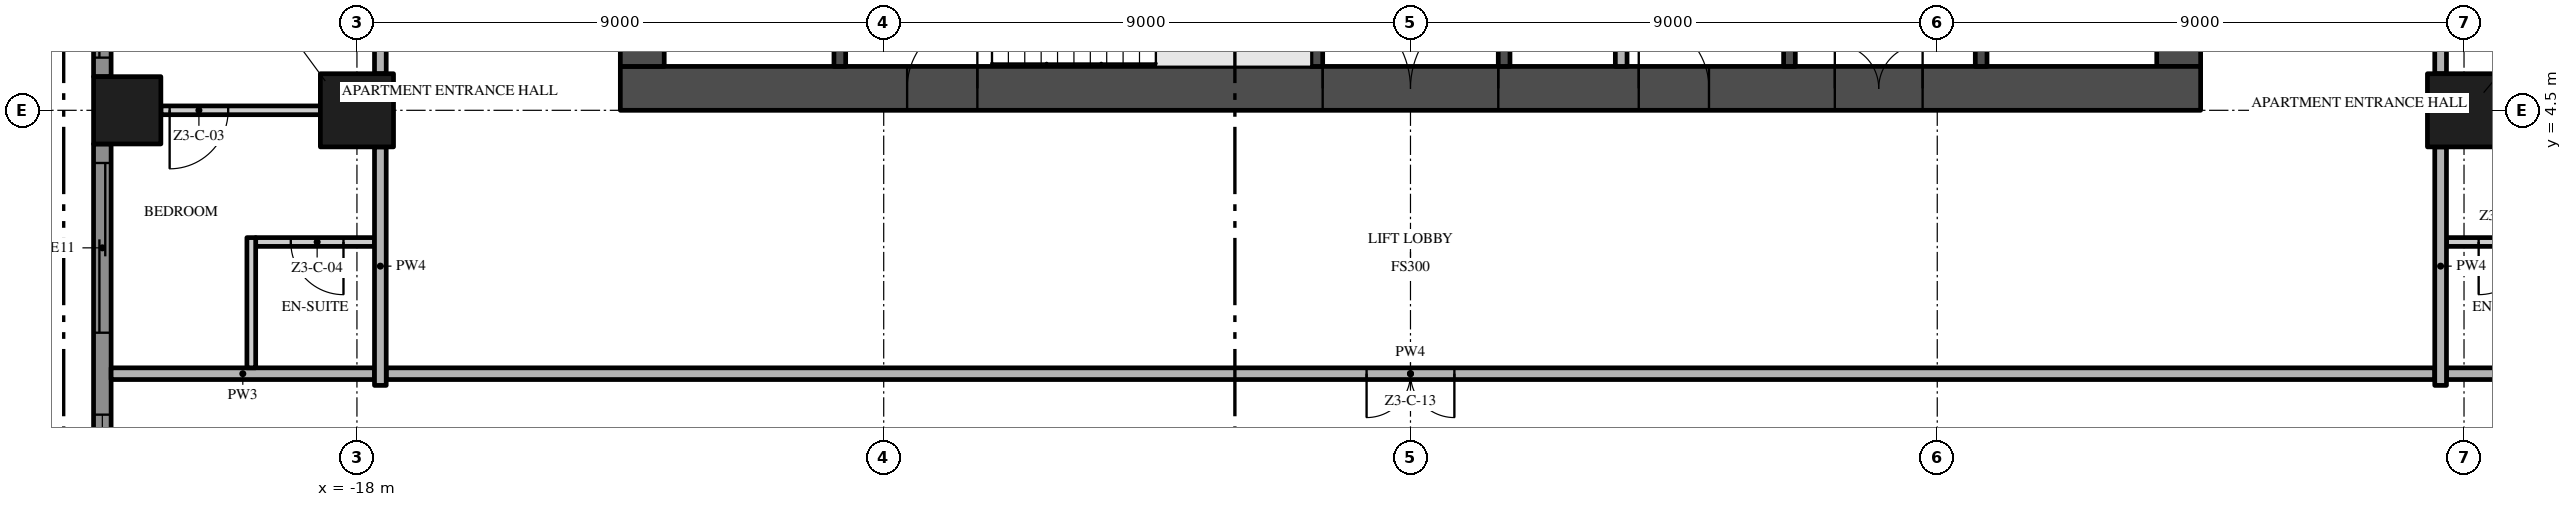
"""IFC4 building model, lengths in metres.
Left out: names, types, materials, properties, quantities, classifications, styles, units other than length and angle.
Written with IfcOpenShell. Run it as: python <this file> out.ifc"""

import sys

from ifc_helpers import new_model, si_unit, direction, frame, frame_2d, origin, origin_2d, place, context, subcontext, project, spatial, polyline, rectangle, outline, extrude, element, fill, save


model = new_model("IFC4")
c1 = context("Model", 3, precision=1e-05, world=origin(), true_north=direction((0.0, 1.0)))
c2 = subcontext(c1, "Body", "Model", "MODEL_VIEW")
j1 = project(units=[si_unit("LENGTHUNIT", "METRE"), si_unit("PLANEANGLEUNIT", "RADIAN")], contexts=[c1])
p1 = place(None, origin())
s1 = spatial("IfcSite", under=j1, at=p1, CompositionType="ELEMENT")
p2 = place(p1, origin())
s2 = spatial("IfcBuilding", under=s1, at=p2, CompositionType="ELEMENT")
p3 = place(p2, frame((0.0, 0.0, 155.4)))
s3 = spatial("IfcBuildingStorey", under=s2, at=p3, CompositionType="ELEMENT", Elevation=155.4)
p4 = place(p3, frame((-13.5, 4.875, -0.3), z_axis=(0.0, 0.0, 1.0), x_axis=(1.0, 0.0, 0.0)))
e1 = element("IfcWall", 1, at=p4, inside=s3, PredefinedType="SHEAR", context=c2, shape_type="SweptSolid", body=[
    extrude(rectangle(XDim=27.0, YDim=0.75, at=frame_2d((13.5, 0.0))), origin(), (0.0, 0.0, 1.0), 3.8),
])
p5 = place(p4, frame((12.0, 0.0, 0.3)))
e2 = element("IfcOpeningElement", 2, at=p5, cuts=e1, PredefinedType="OPENING", context=c2, shape_type="SweptSolid", body=[
    extrude(rectangle(XDim=3.0, YDim=2.4, at=frame_2d((1.5, 1.2))), frame((0.0, 0.385, 0.0), z_axis=(0.0, -1.0, 0.0), x_axis=(1.0, 0.0, 0.0)), (0.0, 0.0, 1.0), 0.77),
])
p6 = place(p4, frame((4.9, 0.0, 0.3)))
e3 = element("IfcOpeningElement", 3, at=p6, cuts=e1, PredefinedType="OPENING", context=c2, shape_type="SweptSolid", body=[
    extrude(rectangle(XDim=1.2, YDim=2.2, at=frame_2d((0.6, 1.1))), frame((0.0, 0.385, 0.0), z_axis=(0.0, -1.0, 0.0), x_axis=(1.0, 0.0, 0.0)), (0.0, 0.0, 1.0), 0.77),
])
p7 = place(p4, frame((20.75, 0.0, 0.3)))
e4 = element("IfcOpeningElement", 4, at=p7, cuts=e1, PredefinedType="OPENING", context=c2, shape_type="SweptSolid", body=[
    extrude(rectangle(XDim=1.5, YDim=2.2, at=frame_2d((0.75, 1.1))), frame((0.0, 0.385, 0.0), z_axis=(0.0, -1.0, 0.0), x_axis=(1.0, 0.0, 0.0)), (0.0, 0.0, 1.0), 0.77),
])
p8 = place(p4, frame((17.4, 0.0, 0.3)))
e5 = element("IfcOpeningElement", 5, at=p8, cuts=e1, PredefinedType="OPENING", context=c2, shape_type="SweptSolid", body=[
    extrude(rectangle(XDim=1.2, YDim=2.2, at=frame_2d((0.6, 1.1))), frame((0.0, 0.385, 0.0), z_axis=(0.0, -1.0, 0.0), x_axis=(1.0, 0.0, 0.0)), (0.0, 0.0, 1.0), 0.77),
])
p9 = place(p3, frame((13.125, 5.25, -0.3), z_axis=(0.0, 0.0, 1.0), x_axis=(0.0, 1.0, 0.0)))
e6 = element("IfcWall", 6, at=p9, inside=s3, PredefinedType="SHEAR", context=c2, shape_type="SweptSolid", body=[
    extrude(rectangle(XDim=16.5, YDim=0.75, at=frame_2d((8.25, 0.0))), origin(), (0.0, 0.0, 1.0), 3.8),
])
p10 = place(p9, frame((6.15, 0.0, 0.3)))
e7 = element("IfcOpeningElement", 7, at=p10, cuts=e6, PredefinedType="OPENING", context=c2, shape_type="SweptSolid", body=[
    extrude(rectangle(XDim=1.2, YDim=2.2, at=frame_2d((0.6, 1.1))), frame((0.0, 0.385, 0.0), z_axis=(0.0, -1.0, 0.0), x_axis=(1.0, 0.0, 0.0)), (0.0, 0.0, 1.0), 0.77),
])
p11 = place(p3, frame((-13.125, 21.75, -0.3), z_axis=(0.0, 0.0, 1.0), x_axis=(0.0, -1.0, 0.0)))
e8 = element("IfcWall", 8, at=p11, inside=s3, PredefinedType="SHEAR", context=c2, shape_type="SweptSolid", body=[
    extrude(rectangle(XDim=16.5, YDim=0.75, at=frame_2d((8.25, 0.0))), origin(), (0.0, 0.0, 1.0), 3.8),
])
p12 = place(p11, frame((9.15, 0.0, 0.3)))
e9 = element("IfcOpeningElement", 9, at=p12, cuts=e8, PredefinedType="OPENING", context=c2, shape_type="SweptSolid", body=[
    extrude(rectangle(XDim=1.2, YDim=2.2, at=frame_2d((0.6, 1.1))), frame((0.0, 0.385, 0.0), z_axis=(0.0, -1.0, 0.0), x_axis=(1.0, 0.0, 0.0)), (0.0, 0.0, 1.0), 0.77),
])
p13 = place(p3, frame((-18.0, 4.5, 0.0), z_axis=(0.0, 0.0, 1.0), x_axis=(1.0, 0.0, 0.0)))
e10 = element("IfcColumn", 10, at=p13, inside=s3, PredefinedType="COLUMN", context=c2, shape_type="SweptSolid", body=[
    extrude(rectangle(XDim=1.25, YDim=1.25, at=origin_2d()), origin(), (0.0, 0.0, 1.0), 3.5),
])
p14 = place(p3, frame((-21.925, 4.5, 0.0), z_axis=(0.0, 0.0, 1.0), x_axis=(1.0, 0.0, 0.0)))
e11 = element("IfcColumn", 11, at=p14, inside=s3, PredefinedType="COLUMN", context=c2, shape_type="SweptSolid", body=[
    extrude(rectangle(XDim=1.15, YDim=1.15, at=origin_2d()), origin(), (0.0, 0.0, 1.0), 3.5),
])
p15 = place(p3, frame((18.0, 4.5, 0.0), z_axis=(0.0, 0.0, 1.0), x_axis=(1.0, 0.0, 0.0)))
e12 = element("IfcColumn", 12, at=p15, inside=s3, PredefinedType="COLUMN", context=c2, shape_type="SweptSolid", body=[
    extrude(rectangle(XDim=1.25, YDim=1.25, at=origin_2d()), origin(), (0.0, 0.0, 1.0), 3.5),
])
p16 = place(p3, frame((-22.35, 5.075, 0.0), z_axis=(0.0, 0.0, 1.0), x_axis=(0.0, 1.0, 0.0)))
e13 = element("IfcWall", 13, at=p16, inside=s3, PredefinedType="SOLIDWALL", context=c2, shape_type="SweptSolid", body=[
    extrude(rectangle(XDim=7.85, YDim=0.3, at=frame_2d((3.925, 0.0))), origin(), (0.0, 0.0, 1.0), 3.5),
])
p17 = place(p16, frame((4.625, 0.0, 0.45)))
e14 = element("IfcOpeningElement", 14, at=p17, cuts=e13, PredefinedType="OPENING", context=c2, shape_type="SweptSolid", body=[
    extrude(rectangle(XDim=2.9, YDim=2.65, at=frame_2d((1.45, 1.325))), frame((0.0, 0.16, 0.0), z_axis=(0.0, -1.0, 0.0), x_axis=(1.0, 0.0, 0.0)), (0.0, 0.0, 1.0), 0.32),
])
p18 = place(p16, frame((0.325, 0.0, 0.0)))
e15 = element("IfcOpeningElement", 15, at=p18, cuts=e13, PredefinedType="OPENING", context=c2, shape_type="SweptSolid", body=[
    extrude(rectangle(XDim=2.9, YDim=2.4, at=frame_2d((1.45, 1.2))), frame((0.0, 0.16, 0.0), z_axis=(0.0, -1.0, 0.0), x_axis=(1.0, 0.0, 0.0)), (0.0, 0.0, 1.0), 0.32),
])
p19 = place(p3, frame((-22.35, -3.925, 0.0), z_axis=(0.0, 0.0, 1.0), x_axis=(0.0, 1.0, 0.0)))
e16 = element("IfcWall", 16, at=p19, inside=s3, PredefinedType="SOLIDWALL", context=c2, shape_type="SweptSolid", body=[
    extrude(rectangle(XDim=7.85, YDim=0.3, at=frame_2d((3.925, 0.0))), origin(), (0.0, 0.0, 1.0), 3.5),
])
p20 = place(p19, frame((4.625, 0.0, 0.0)))
e17 = element("IfcOpeningElement", 17, at=p20, cuts=e16, PredefinedType="OPENING", context=c2, shape_type="SweptSolid", body=[
    extrude(rectangle(XDim=2.9, YDim=2.4, at=frame_2d((1.45, 1.2))), frame((0.0, 0.16, 0.0), z_axis=(0.0, -1.0, 0.0), x_axis=(1.0, 0.0, 0.0)), (0.0, 0.0, 1.0), 0.32),
])
p21 = place(p19, frame((0.325, 0.0, 0.45)))
e18 = element("IfcOpeningElement", 18, at=p21, cuts=e16, PredefinedType="OPENING", context=c2, shape_type="SweptSolid", body=[
    extrude(rectangle(XDim=2.9, YDim=2.65, at=frame_2d((1.45, 1.325))), frame((0.0, 0.16, 0.0), z_axis=(0.0, -1.0, 0.0), x_axis=(1.0, 0.0, 0.0)), (0.0, 0.0, 1.0), 0.32),
])
p22 = place(p3, origin())
e19 = element("IfcWall", 19, at=p22, inside=s3, PredefinedType="USERDEFINED", context=c2, shape_type="SweptSolid", body=[
    extrude(outline(polyline([(-25.149, 18.0), (-24.488, 16.5), (-23.755, 15.0), (-23.231, 13.5), (-23.1, 12.375), (-23.115, 12.0), (-23.451, 10.5), (-24.112, 9.0), (-24.845, 7.5), (-25.369, 6.0), (-25.5, 4.875), (-25.485, 4.5), (-25.149, 3.0), (-24.488, 1.5), (-23.755, 0.0), (-23.231, -1.5), (-23.1, -2.625), (-23.115, -3.0), (-23.451, -4.5), (-24.112, -6.0), (-24.845, -7.5), (-25.369, -9.0), (-25.5, -10.125), (-25.485, -10.5), (-25.149, -12.0), (-24.488, -13.5), (-24.259, -13.399), (-24.91, -11.921), (-25.236, -10.467), (-25.249, -10.135), (-25.124, -9.056), (-24.614, -7.596), (-23.885, -6.105), (-23.213, -4.579), (-22.866, -3.033), (-22.849, -2.615), (-22.986, -1.444), (-23.524, 0.096), (-24.261, 1.605), (-24.91, 3.079), (-25.236, 4.533), (-25.249, 4.865), (-25.124, 5.944), (-24.614, 7.404), (-23.885, 8.895), (-23.213, 10.421), (-22.866, 11.967), (-22.849, 12.385), (-22.986, 13.556), (-23.524, 15.096), (-24.261, 16.605), (-24.92, 18.101), (-25.149, 18.0)])), origin(), (0.0, 0.0, 1.0), 0.9),
])
for number, where, z_axis, x_axis in (
    (20, (-9.75, 5.25, 0.0), (0.0, 0.0, 1.0), (0.0, 1.0, 0.0)),
    (21, (-1.6, 5.25, 0.0), (0.0, 0.0, 1.0), (0.0, 1.0, 0.0)),
):
    element("IfcWall", number, at=place(p3, frame(where, z_axis=z_axis, x_axis=x_axis)), inside=s3, PredefinedType="SHEAR", context=c2, shape_type="SweptSolid", body=[
        extrude(rectangle(XDim=2.7, YDim=0.2, at=frame_2d((1.35, 0.0))), origin(), (0.0, 0.0, 1.0), 3.5),
    ])
p23 = place(p3, frame((1.6, 13.5, 0.0), z_axis=(0.0, 0.0, 1.0), x_axis=(0.0, -1.0, 0.0)))
e22 = element("IfcWall", 22, at=p23, inside=s3, PredefinedType="SHEAR", context=c2, shape_type="SweptSolid", body=[
    extrude(rectangle(XDim=8.25, YDim=0.2, at=frame_2d((4.125, 0.0))), origin(), (0.0, 0.0, 1.0), 3.5),
])
p24 = place(p23, frame((3.275, 0.0, 0.0)))
e23 = element("IfcOpeningElement", 23, at=p24, cuts=e22, PredefinedType="OPENING", context=c2, shape_type="SweptSolid", body=[
    extrude(rectangle(XDim=0.9, YDim=2.1, at=frame_2d((0.45, 1.05))), frame((0.0, 0.11, 0.0), z_axis=(0.0, -1.0, 0.0), x_axis=(1.0, 0.0, 0.0)), (0.0, 0.0, 1.0), 0.22),
])
p25 = place(p3, frame((3.6, 13.5, 0.0), z_axis=(0.0, 0.0, 1.0), x_axis=(0.0, -1.0, 0.0)))
e24 = element("IfcWall", 24, at=p25, inside=s3, PredefinedType="PARTITIONING", context=c2, shape_type="SweptSolid", body=[
    extrude(rectangle(XDim=8.25, YDim=0.2, at=frame_2d((4.125, 0.0))), origin(), (0.0, 0.0, 1.0), 3.5),
])
p26 = place(p25, frame((3.675, 0.0, 0.0)))
e25 = element("IfcOpeningElement", 25, at=p26, cuts=e24, PredefinedType="OPENING", context=c2, shape_type="SweptSolid", body=[
    extrude(rectangle(XDim=0.9, YDim=2.1, at=frame_2d((0.45, 1.05))), frame((0.0, 0.11, 0.0), z_axis=(0.0, -1.0, 0.0), x_axis=(1.0, 0.0, 0.0)), (0.0, 0.0, 1.0), 0.22),
])
p27 = place(p3, frame((6.475, 5.25, 0.0), z_axis=(0.0, 0.0, 1.0), x_axis=(0.0, 1.0, 0.0)))
e26 = element("IfcWall", 26, at=p27, inside=s3, PredefinedType="SHEAR", context=c2, shape_type="SweptSolid", body=[
    extrude(rectangle(XDim=6.85, YDim=0.2, at=frame_2d((3.425, 0.0))), origin(), (0.0, 0.0, 1.0), 3.5),
])
p28 = place(p3, frame((9.75, 5.25, 0.0), z_axis=(0.0, 0.0, 1.0), x_axis=(0.0, 1.0, 0.0)))
e27 = element("IfcWall", 27, at=p28, inside=s3, PredefinedType="SHEAR", context=c2, shape_type="SweptSolid", body=[
    extrude(rectangle(XDim=2.35, YDim=0.2, at=frame_2d((1.175, 0.0))), origin(), (0.0, 0.0, 1.0), 3.5),
])
p29 = place(p28, frame((0.7, 0.0, 0.0)))
e28 = element("IfcOpeningElement", 28, at=p29, cuts=e27, PredefinedType="OPENING", context=c2, shape_type="SweptSolid", body=[
    extrude(rectangle(XDim=1.1, YDim=2.1, at=frame_2d((0.55, 1.05))), frame((0.0, 0.11, 0.0), z_axis=(0.0, -1.0, 0.0), x_axis=(1.0, 0.0, 0.0)), (0.0, 0.0, 1.0), 0.22),
])
p30 = place(p3, frame((17.5, 0.0, 0.0), z_axis=(0.0, 0.0, 1.0), x_axis=(-1.0, 0.0, 0.0)))
e29 = element("IfcWall", 29, at=p30, inside=s3, PredefinedType="PARTITIONING", context=c2, shape_type="SweptSolid", body=[
    extrude(rectangle(XDim=35.0, YDim=0.2, at=frame_2d((17.5, 0.0))), origin(), (0.0, 0.0, 1.0), 3.5),
])
p31 = place(p30, frame((16.75, 0.0, 0.0)))
e30 = element("IfcOpeningElement", 30, at=p31, cuts=e29, PredefinedType="OPENING", context=c2, shape_type="SweptSolid", body=[
    extrude(rectangle(XDim=1.5, YDim=2.4, at=frame_2d((0.75, 1.2))), frame((0.0, 0.11, 0.0), z_axis=(0.0, -1.0, 0.0), x_axis=(1.0, 0.0, 0.0)), (0.0, 0.0, 1.0), 0.22),
])
for number, where, z_axis, x_axis in (
    (31, (-22.2, 0.0, 0.0), (0.0, 0.0, 1.0), (1.0, 0.0, 0.0)),
    (32, (17.7, 0.0, 0.0), (0.0, 0.0, 1.0), (1.0, 0.0, 0.0)),
):
    element("IfcWall", number, at=place(p3, frame(where, z_axis=z_axis, x_axis=x_axis)), inside=s3, PredefinedType="PARTITIONING", context=c2, shape_type="SweptSolid", body=[
        extrude(rectangle(XDim=4.5, YDim=0.2, at=frame_2d((2.25, 0.0))), origin(), (0.0, 0.0, 1.0), 3.5),
    ])
p32 = place(p3, frame((-17.7, 2.25, 0.0), z_axis=(0.0, 0.0, 1.0), x_axis=(-1.0, 0.0, 0.0)))
e33 = element("IfcWall", 33, at=p32, inside=s3, PredefinedType="PARTITIONING", context=c2, shape_type="SweptSolid", body=[
    extrude(rectangle(XDim=2.03, YDim=0.15, at=frame_2d((1.015, 0.0))), origin(), (0.0, 0.0, 1.0), 3.5),
])
p33 = place(p32, frame((0.53, 0.0, 0.0)))
e34 = element("IfcOpeningElement", 34, at=p33, cuts=e33, PredefinedType="OPENING", context=c2, shape_type="SweptSolid", body=[
    extrude(rectangle(XDim=0.9, YDim=2.1, at=frame_2d((0.45, 1.05))), frame((0.0, 0.085, 0.0), z_axis=(0.0, -1.0, 0.0), x_axis=(1.0, 0.0, 0.0)), (0.0, 0.0, 1.0), 0.17),
])
p34 = place(p3, frame((19.73, 2.25, 0.0), z_axis=(0.0, 0.0, 1.0), x_axis=(-1.0, 0.0, 0.0)))
e35 = element("IfcWall", 35, at=p34, inside=s3, PredefinedType="PARTITIONING", context=c2, shape_type="SweptSolid", body=[
    extrude(rectangle(XDim=2.03, YDim=0.15, at=frame_2d((1.015, 0.0))), origin(), (0.0, 0.0, 1.0), 3.5),
])
p35 = place(p34, frame((0.58, 0.0, 0.0)))
e36 = element("IfcOpeningElement", 36, at=p35, cuts=e35, PredefinedType="OPENING", context=c2, shape_type="SweptSolid", body=[
    extrude(rectangle(XDim=0.9, YDim=2.1, at=frame_2d((0.45, 1.05))), frame((0.0, 0.085, 0.0), z_axis=(0.0, -1.0, 0.0), x_axis=(1.0, 0.0, 0.0)), (0.0, 0.0, 1.0), 0.17),
])
p36 = place(p3, frame((-18.625, 4.5, 0.0), z_axis=(0.0, 0.0, 1.0), x_axis=(-1.0, 0.0, 0.0)))
e37 = element("IfcWall", 37, at=p36, inside=s3, PredefinedType="PARTITIONING", context=c2, shape_type="SweptSolid", body=[
    extrude(rectangle(XDim=2.725, YDim=0.15, at=frame_2d((1.363, 0.0))), origin(), (0.0, 0.0, 1.0), 3.5),
])
p37 = place(p36, frame((1.575, 0.0, 0.0)))
e38 = element("IfcOpeningElement", 38, at=p37, cuts=e37, PredefinedType="OPENING", context=c2, shape_type="SweptSolid", body=[
    extrude(rectangle(XDim=1.0, YDim=2.4, at=frame_2d((0.5, 1.2))), frame((0.0, 0.085, 0.0), z_axis=(0.0, -1.0, 0.0), x_axis=(1.0, 0.0, 0.0)), (0.0, 0.0, 1.0), 0.17),
])
p38 = place(p3, frame((-19.805, 0.1, 0.0), z_axis=(0.0, 0.0, 1.0), x_axis=(0.0, 1.0, 0.0)))
e39 = element("IfcWall", 39, at=p38, inside=s3, PredefinedType="PARTITIONING", context=c2, shape_type="SweptSolid", body=[
    extrude(rectangle(XDim=2.225, YDim=0.15, at=frame_2d((1.113, 0.0))), origin(), (0.0, 0.0, 1.0), 3.5),
])
p39 = place(p3, frame((-17.6, -0.2, 0.0), z_axis=(0.0, 0.0, 1.0), x_axis=(0.0, 1.0, 0.0)))
e40 = element("IfcWall", 40, at=p39, inside=s3, PredefinedType="PARTITIONING", context=c2, shape_type="SweptSolid", body=[
    extrude(rectangle(XDim=4.075, YDim=0.2, at=frame_2d((2.038, 0.0))), origin(), (0.0, 0.0, 1.0), 3.5),
])
p40 = place(p3, frame((-17.6, 5.125, 0.0), z_axis=(0.0, 0.0, 1.0), x_axis=(0.0, 1.0, 0.0)))
e41 = element("IfcWall", 41, at=p40, inside=s3, PredefinedType="PARTITIONING", context=c2, shape_type="SweptSolid", body=[
    extrude(rectangle(XDim=7.75, YDim=0.2, at=frame_2d((3.875, 0.0))), origin(), (0.0, 0.0, 1.0), 3.5),
])
p41 = place(p40, frame((1.0, 0.0, 0.0)))
e42 = element("IfcOpeningElement", 42, at=p41, cuts=e41, PredefinedType="OPENING", context=c2, shape_type="SweptSolid", body=[
    extrude(rectangle(XDim=1.2, YDim=2.4, at=frame_2d((0.6, 1.2))), frame((0.0, 0.11, 0.0), z_axis=(0.0, -1.0, 0.0), x_axis=(1.0, 0.0, 0.0)), (0.0, 0.0, 1.0), 0.22),
])
p42 = place(p3, frame((17.6, -0.2, 0.0), z_axis=(0.0, 0.0, 1.0), x_axis=(0.0, 1.0, 0.0)))
e43 = element("IfcWall", 43, at=p42, inside=s3, PredefinedType="PARTITIONING", context=c2, shape_type="SweptSolid", body=[
    extrude(rectangle(XDim=4.075, YDim=0.2, at=frame_2d((2.038, 0.0))), origin(), (0.0, 0.0, 1.0), 3.5),
])
p43 = place(p3, frame((17.6, 12.875, 0.0), z_axis=(0.0, 0.0, 1.0), x_axis=(0.0, -1.0, 0.0)))
e44 = element("IfcWall", 44, at=p43, inside=s3, PredefinedType="PARTITIONING", context=c2, shape_type="SweptSolid", body=[
    extrude(rectangle(XDim=7.75, YDim=0.2, at=frame_2d((3.875, 0.0))), origin(), (0.0, 0.0, 1.0), 3.5),
])
p44 = place(p43, frame((5.55, 0.0, 0.0)))
e45 = element("IfcOpeningElement", 45, at=p44, cuts=e44, PredefinedType="OPENING", context=c2, shape_type="SweptSolid", body=[
    extrude(rectangle(XDim=1.2, YDim=2.4, at=frame_2d((0.6, 1.2))), frame((0.0, 0.11, 0.0), z_axis=(0.0, -1.0, 0.0), x_axis=(1.0, 0.0, 0.0)), (0.0, 0.0, 1.0), 0.22),
])
p45 = place(p18, origin())
e46 = element("IfcDoor", 46, at=p45, inside=s3, OperationType="SINGLE_SWING_LEFT", PredefinedType="DOOR", context=c2, shape_type="SweptSolid", body=[
    extrude(rectangle(XDim=2.9, YDim=2.4, at=frame_2d((1.45, 1.2))), frame((0.0, 0.025, 0.0), z_axis=(0.0, -1.0, 0.0), x_axis=(1.0, 0.0, 0.0)), (0.0, 0.0, 1.0), 0.05),
])
fill(e15, e46)
p46 = place(p20, origin())
e47 = element("IfcDoor", 47, at=p46, inside=s3, OperationType="SINGLE_SWING_LEFT", PredefinedType="DOOR", context=c2, shape_type="SweptSolid", body=[
    extrude(rectangle(XDim=2.9, YDim=2.4, at=frame_2d((1.45, 1.2))), frame((0.0, 0.025, 0.0), z_axis=(0.0, -1.0, 0.0), x_axis=(1.0, 0.0, 0.0)), (0.0, 0.0, 1.0), 0.05),
])
fill(e17, e47)
p47 = place(p21, origin())
e48 = element("IfcWindow", 48, at=p47, inside=s3, PartitioningType="SINGLE_PANEL", PredefinedType="WINDOW", context=c2, shape_type="SweptSolid", body=[
    extrude(rectangle(XDim=2.9, YDim=2.65, at=frame_2d((1.45, 1.325))), frame((0.0, 0.03, 0.0), z_axis=(0.0, -1.0, 0.0), x_axis=(1.0, 0.0, 0.0)), (0.0, 0.0, 1.0), 0.06),
])
fill(e18, e48)
p48 = place(p5, frame((3.0, 0.0, 0.0), z_axis=(0.0, 0.0, 1.0), x_axis=(-1.0, 0.0, 0.0)))
e49 = element("IfcDoor", 49, at=p48, inside=s3, OperationType="DOUBLE_DOOR_SINGLE_SWING", PredefinedType="DOOR", context=c2, shape_type="SweptSolid", body=[
    extrude(rectangle(XDim=3.0, YDim=2.4, at=frame_2d((1.5, 1.2))), frame((0.0, 0.025, 0.0), z_axis=(0.0, -1.0, 0.0), x_axis=(1.0, 0.0, 0.0)), (0.0, 0.0, 1.0), 0.05),
])
fill(e2, e49)
p49 = place(p6, frame((1.2, 0.0, 0.0), z_axis=(0.0, 0.0, 1.0), x_axis=(-1.0, 0.0, 0.0)))
e50 = element("IfcDoor", 50, at=p49, inside=s3, OperationType="SINGLE_SWING_LEFT", PredefinedType="DOOR", context=c2, shape_type="SweptSolid", body=[
    extrude(rectangle(XDim=1.2, YDim=2.2, at=frame_2d((0.6, 1.1))), frame((0.0, 0.025, 0.0), z_axis=(0.0, -1.0, 0.0), x_axis=(1.0, 0.0, 0.0)), (0.0, 0.0, 1.0), 0.05),
])
fill(e3, e50)
p50 = place(p7, frame((1.5, 0.0, 0.0), z_axis=(0.0, 0.0, 1.0), x_axis=(-1.0, 0.0, 0.0)))
e51 = element("IfcDoor", 51, at=p50, inside=s3, OperationType="DOUBLE_DOOR_SINGLE_SWING", PredefinedType="DOOR", context=c2, shape_type="SweptSolid", body=[
    extrude(rectangle(XDim=1.5, YDim=2.2, at=frame_2d((0.75, 1.1))), frame((0.0, 0.025, 0.0), z_axis=(0.0, -1.0, 0.0), x_axis=(1.0, 0.0, 0.0)), (0.0, 0.0, 1.0), 0.05),
])
fill(e4, e51)
p51 = place(p8, frame((1.2, 0.0, 0.0), z_axis=(0.0, 0.0, 1.0), x_axis=(-1.0, 0.0, 0.0)))
e52 = element("IfcDoor", 52, at=p51, inside=s3, OperationType="SINGLE_SWING_RIGHT", PredefinedType="DOOR", context=c2, shape_type="SweptSolid", body=[
    extrude(rectangle(XDim=1.2, YDim=2.2, at=frame_2d((0.6, 1.1))), frame((0.0, 0.025, 0.0), z_axis=(0.0, -1.0, 0.0), x_axis=(1.0, 0.0, 0.0)), (0.0, 0.0, 1.0), 0.05),
])
fill(e5, e52)
p52 = place(p37, origin())
e53 = element("IfcDoor", 53, at=p52, inside=s3, OperationType="SINGLE_SWING_RIGHT", PredefinedType="DOOR", context=c2, shape_type="SweptSolid", body=[
    extrude(rectangle(XDim=1.0, YDim=2.4, at=frame_2d((0.5, 1.2))), frame((0.0, 0.025, 0.0), z_axis=(0.0, -1.0, 0.0), x_axis=(1.0, 0.0, 0.0)), (0.0, 0.0, 1.0), 0.05),
])
fill(e38, e53)
p53 = place(p33, origin())
e54 = element("IfcDoor", 54, at=p53, inside=s3, OperationType="SINGLE_SWING_LEFT", PredefinedType="DOOR", context=c2, shape_type="SweptSolid", body=[
    extrude(rectangle(XDim=0.9, YDim=2.1, at=frame_2d((0.45, 1.05))), frame((0.0, 0.025, 0.0), z_axis=(0.0, -1.0, 0.0), x_axis=(1.0, 0.0, 0.0)), (0.0, 0.0, 1.0), 0.05),
])
fill(e34, e54)
p54 = place(p35, origin())
e55 = element("IfcDoor", 55, at=p54, inside=s3, OperationType="SINGLE_SWING_RIGHT", PredefinedType="DOOR", context=c2, shape_type="SweptSolid", body=[
    extrude(rectangle(XDim=0.9, YDim=2.1, at=frame_2d((0.45, 1.05))), frame((0.0, 0.025, 0.0), z_axis=(0.0, -1.0, 0.0), x_axis=(1.0, 0.0, 0.0)), (0.0, 0.0, 1.0), 0.05),
])
fill(e36, e55)
p55 = place(p31, origin())
e56 = element("IfcDoor", 56, at=p55, inside=s3, OperationType="DOUBLE_DOOR_SINGLE_SWING", PredefinedType="DOOR", context=c2, shape_type="SweptSolid", body=[
    extrude(rectangle(XDim=1.5, YDim=2.4, at=frame_2d((0.75, 1.2))), frame((0.0, 0.025, 0.0), z_axis=(0.0, -1.0, 0.0), x_axis=(1.0, 0.0, 0.0)), (0.0, 0.0, 1.0), 0.05),
])
fill(e30, e56)
save(model, sys.argv[1])
